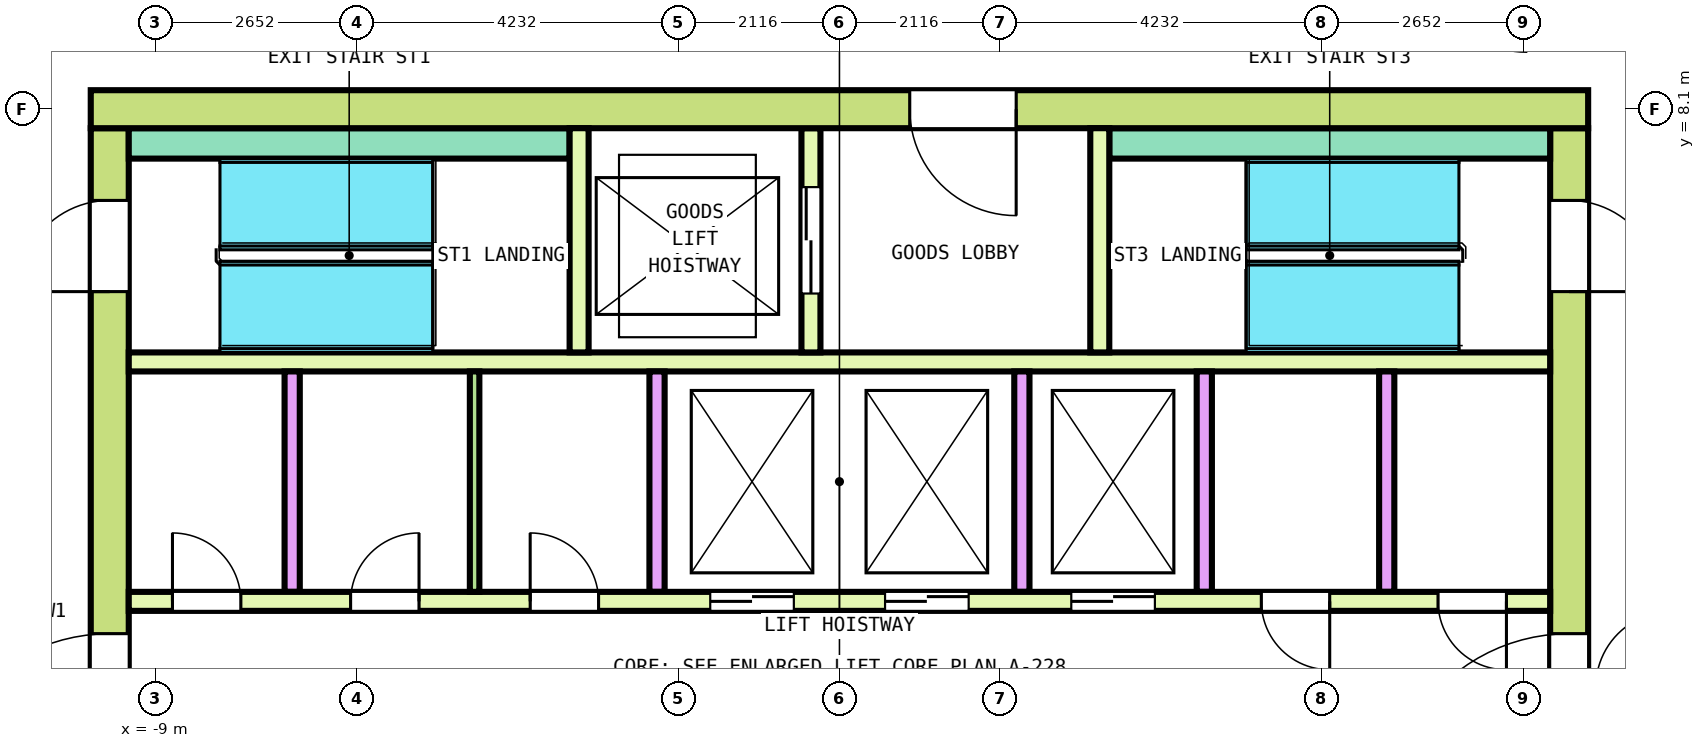
"""IFC4 building model, lengths in metres.
Left out: names, types, materials, properties, quantities, classifications, styles, units other than length and angle.
Written with IfcOpenShell. Run it as: python <this file> out.ifc"""

import sys

from ifc_helpers import new_model, si_unit, direction, frame, frame_2d, origin, place, context, subcontext, project, spatial, rectangle, extrude, element, fill, save


model = new_model("IFC4")
c1 = context("Model", 3, precision=1e-05, world=origin(), true_north=direction((0.0, 1.0)))
c2 = subcontext(c1, "Body", "Model", "MODEL_VIEW")
j1 = project(units=[si_unit("LENGTHUNIT", "METRE"), si_unit("PLANEANGLEUNIT", "RADIAN")], contexts=[c1])
p1 = place(None, origin())
s1 = spatial("IfcSite", under=j1, at=p1, CompositionType="ELEMENT")
p2 = place(p1, origin())
s2 = spatial("IfcBuilding", under=s1, at=p2, CompositionType="ELEMENT")
p3 = place(p2, frame((0.0, 0.0, 324.6)))
s3 = spatial("IfcBuildingStorey", under=s2, at=p3, CompositionType="ELEMENT", Elevation=324.6)
p4 = place(p3, frame((-9.85, 8.1, 0.0), z_axis=(0.0, 0.0, 1.0), x_axis=(1.0, 0.0, 0.0)))
e1 = element("IfcWall", 1, at=p4, inside=s3, PredefinedType="SHEAR", context=c2, shape_type="SweptSolid", body=[
    extrude(rectangle(XDim=19.7, YDim=0.5, at=frame_2d((9.85, 0.0))), origin(), (0.0, 0.0, 1.0), 3.7),
])
p5 = place(p4, frame((10.775, 0.0, 0.0)))
e2 = element("IfcOpeningElement", 2, at=p5, cuts=e1, PredefinedType="OPENING", context=c2, shape_type="SweptSolid", body=[
    extrude(rectangle(XDim=1.4, YDim=2.1, at=frame_2d((0.7, 1.05))), frame((0.0, 0.26, 0.0), z_axis=(0.0, -1.0, 0.0), x_axis=(1.0, 0.0, 0.0)), (0.0, 0.0, 1.0), 0.52),
])
p6 = place(p3, frame((-9.6, -7.85, 0.0), z_axis=(0.0, 0.0, 1.0), x_axis=(0.0, 1.0, 0.0)))
e3 = element("IfcWall", 3, at=p6, inside=s3, PredefinedType="SHEAR", context=c2, shape_type="SweptSolid", body=[
    extrude(rectangle(XDim=15.7, YDim=0.5, at=frame_2d((7.85, 0.0))), origin(), (0.0, 0.0, 1.0), 3.7),
])
p7 = place(p6, frame((6.65, 0.0, 0.0)))
e4 = element("IfcOpeningElement", 4, at=p7, cuts=e3, PredefinedType="OPENING", context=c2, shape_type="SweptSolid", body=[
    extrude(rectangle(XDim=2.4, YDim=2.1, at=frame_2d((1.2, 1.05))), frame((0.0, 0.26, 0.0), z_axis=(0.0, -1.0, 0.0), x_axis=(1.0, 0.0, 0.0)), (0.0, 0.0, 1.0), 0.52),
])
p8 = place(p6, frame((13.55, 0.0, 0.0)))
e5 = element("IfcOpeningElement", 5, at=p8, cuts=e3, PredefinedType="OPENING", context=c2, shape_type="SweptSolid", body=[
    extrude(rectangle(XDim=1.2, YDim=2.1, at=frame_2d((0.6, 1.05))), frame((0.0, 0.26, 0.0), z_axis=(0.0, -1.0, 0.0), x_axis=(1.0, 0.0, 0.0)), (0.0, 0.0, 1.0), 0.52),
])
p9 = place(p6, frame((0.95, 0.0, 0.0)))
e6 = element("IfcOpeningElement", 6, at=p9, cuts=e3, PredefinedType="OPENING", context=c2, shape_type="SweptSolid", body=[
    extrude(rectangle(XDim=1.2, YDim=2.1, at=frame_2d((0.6, 1.05))), frame((0.0, 0.26, 0.0), z_axis=(0.0, -1.0, 0.0), x_axis=(1.0, 0.0, 0.0)), (0.0, 0.0, 1.0), 0.52),
])
p10 = place(p3, frame((9.6, -7.85, 0.0), z_axis=(0.0, 0.0, 1.0), x_axis=(0.0, 1.0, 0.0)))
e7 = element("IfcWall", 7, at=p10, inside=s3, PredefinedType="SHEAR", context=c2, shape_type="SweptSolid", body=[
    extrude(rectangle(XDim=15.7, YDim=0.5, at=frame_2d((7.85, 0.0))), origin(), (0.0, 0.0, 1.0), 3.7),
])
p11 = place(p10, frame((6.65, 0.0, 0.0)))
e8 = element("IfcOpeningElement", 8, at=p11, cuts=e7, PredefinedType="OPENING", context=c2, shape_type="SweptSolid", body=[
    extrude(rectangle(XDim=2.4, YDim=2.1, at=frame_2d((1.2, 1.05))), frame((0.0, 0.26, 0.0), z_axis=(0.0, -1.0, 0.0), x_axis=(1.0, 0.0, 0.0)), (0.0, 0.0, 1.0), 0.52),
])
p12 = place(p10, frame((13.55, 0.0, 0.0)))
e9 = element("IfcOpeningElement", 9, at=p12, cuts=e7, PredefinedType="OPENING", context=c2, shape_type="SweptSolid", body=[
    extrude(rectangle(XDim=1.2, YDim=2.1, at=frame_2d((0.6, 1.05))), frame((0.0, 0.26, 0.0), z_axis=(0.0, -1.0, 0.0), x_axis=(1.0, 0.0, 0.0)), (0.0, 0.0, 1.0), 0.52),
])
p13 = place(p10, frame((1.05, 0.0, 0.0)))
e10 = element("IfcOpeningElement", 10, at=p13, cuts=e7, PredefinedType="OPENING", context=c2, shape_type="SweptSolid", body=[
    extrude(rectangle(XDim=1.0, YDim=2.1, at=frame_2d((0.5, 1.05))), frame((0.0, 0.26, 0.0), z_axis=(0.0, -1.0, 0.0), x_axis=(1.0, 0.0, 0.0)), (0.0, 0.0, 1.0), 0.52),
])
p14 = place(p3, frame((-9.35, 1.625, 0.0), z_axis=(0.0, 0.0, 1.0), x_axis=(1.0, 0.0, 0.0)))
e11 = element("IfcWall", 11, at=p14, inside=s3, PredefinedType="SOLIDWALL", context=c2, shape_type="SweptSolid", body=[
    extrude(rectangle(XDim=18.7, YDim=0.25, at=frame_2d((9.35, 0.0))), origin(), (0.0, 0.0, 1.0), 3.7),
])
p15 = place(p14, frame((7.65, 0.0, 0.0)))
e12 = element("IfcOpeningElement", 12, at=p15, cuts=e11, PredefinedType="OPENING", context=c2, shape_type="SweptSolid", body=[
    extrude(rectangle(XDim=1.1, YDim=2.1, at=frame_2d((0.55, 1.05))), frame((0.0, 0.135, 0.0), z_axis=(0.0, -1.0, 0.0), x_axis=(1.0, 0.0, 0.0)), (0.0, 0.0, 1.0), 0.27),
])
p16 = place(p14, frame((9.95, 0.0, 0.0)))
e13 = element("IfcOpeningElement", 13, at=p16, cuts=e11, PredefinedType="OPENING", context=c2, shape_type="SweptSolid", body=[
    extrude(rectangle(XDim=1.1, YDim=2.1, at=frame_2d((0.55, 1.05))), frame((0.0, 0.135, 0.0), z_axis=(0.0, -1.0, 0.0), x_axis=(1.0, 0.0, 0.0)), (0.0, 0.0, 1.0), 0.27),
])
p17 = place(p14, frame((12.4, 0.0, 0.0)))
e14 = element("IfcOpeningElement", 14, at=p17, cuts=e11, PredefinedType="OPENING", context=c2, shape_type="SweptSolid", body=[
    extrude(rectangle(XDim=1.1, YDim=2.1, at=frame_2d((0.55, 1.05))), frame((0.0, 0.135, 0.0), z_axis=(0.0, -1.0, 0.0), x_axis=(1.0, 0.0, 0.0)), (0.0, 0.0, 1.0), 0.27),
])
p18 = place(p14, frame((0.575, 0.0, 0.0)))
e15 = element("IfcOpeningElement", 15, at=p18, cuts=e11, PredefinedType="OPENING", context=c2, shape_type="SweptSolid", body=[
    extrude(rectangle(XDim=0.9, YDim=2.1, at=frame_2d((0.45, 1.05))), frame((0.0, 0.135, 0.0), z_axis=(0.0, -1.0, 0.0), x_axis=(1.0, 0.0, 0.0)), (0.0, 0.0, 1.0), 0.27),
])
p19 = place(p14, frame((2.919, 0.0, 0.0)))
e16 = element("IfcOpeningElement", 16, at=p19, cuts=e11, PredefinedType="OPENING", context=c2, shape_type="SweptSolid", body=[
    extrude(rectangle(XDim=0.9, YDim=2.1, at=frame_2d((0.45, 1.05))), frame((0.0, 0.135, 0.0), z_axis=(0.0, -1.0, 0.0), x_axis=(1.0, 0.0, 0.0)), (0.0, 0.0, 1.0), 0.27),
])
p20 = place(p14, frame((5.281, 0.0, 0.0)))
e17 = element("IfcOpeningElement", 17, at=p20, cuts=e11, PredefinedType="OPENING", context=c2, shape_type="SweptSolid", body=[
    extrude(rectangle(XDim=0.9, YDim=2.1, at=frame_2d((0.45, 1.05))), frame((0.0, 0.135, 0.0), z_axis=(0.0, -1.0, 0.0), x_axis=(1.0, 0.0, 0.0)), (0.0, 0.0, 1.0), 0.27),
])
p21 = place(p14, frame((14.9, 0.0, 0.0)))
e18 = element("IfcOpeningElement", 18, at=p21, cuts=e11, PredefinedType="OPENING", context=c2, shape_type="SweptSolid", body=[
    extrude(rectangle(XDim=0.9, YDim=2.1, at=frame_2d((0.45, 1.05))), frame((0.0, 0.135, 0.0), z_axis=(0.0, -1.0, 0.0), x_axis=(1.0, 0.0, 0.0)), (0.0, 0.0, 1.0), 0.27),
])
p22 = place(p14, frame((17.225, 0.0, 0.0)))
e19 = element("IfcOpeningElement", 19, at=p22, cuts=e11, PredefinedType="OPENING", context=c2, shape_type="SweptSolid", body=[
    extrude(rectangle(XDim=0.9, YDim=2.1, at=frame_2d((0.45, 1.05))), frame((0.0, 0.135, 0.0), z_axis=(0.0, -1.0, 0.0), x_axis=(1.0, 0.0, 0.0)), (0.0, 0.0, 1.0), 0.27),
])
p23 = place(p3, frame((-9.35, 4.775, 0.0), z_axis=(0.0, 0.0, 1.0), x_axis=(1.0, 0.0, 0.0)))
e20 = element("IfcWall", 20, at=p23, inside=s3, PredefinedType="SOLIDWALL", context=c2, shape_type="SweptSolid", body=[
    extrude(rectangle(XDim=18.7, YDim=0.25, at=frame_2d((9.35, 0.0))), origin(), (0.0, 0.0, 1.0), 3.7),
])
for number, where, z_axis, x_axis in (
    (21, (-7.2, 1.75, 0.0), (0.0, 0.0, 1.0), (0.0, 1.0, 0.0)),
    (22, (-2.4, 1.75, 0.0), (0.0, 0.0, 1.0), (0.0, 1.0, 0.0)),
    (23, (2.4, 1.75, 0.0), (0.0, 0.0, 1.0), (0.0, 1.0, 0.0)),
    (24, (4.8, 1.75, 0.0), (0.0, 0.0, 1.0), (0.0, 1.0, 0.0)),
    (25, (7.2, 1.75, 0.0), (0.0, 0.0, 1.0), (0.0, 1.0, 0.0)),
):
    element("IfcWall", number, at=place(p3, frame(where, z_axis=z_axis, x_axis=x_axis)), inside=s3, PredefinedType="SOLIDWALL", context=c2, shape_type="SweptSolid", body=[
        extrude(rectangle(XDim=2.9, YDim=0.2, at=frame_2d((1.45, 0.0))), origin(), (0.0, 0.0, 1.0), 3.7),
    ])
for number, where, z_axis, x_axis in (
    (26, (-9.35, 7.65, 0.0), (0.0, 0.0, 1.0), (1.0, 0.0, 0.0)),
    (27, (3.55, 7.65, 0.0), (0.0, 0.0, 1.0), (1.0, 0.0, 0.0)),
):
    element("IfcWall", number, at=place(p3, frame(where, z_axis=z_axis, x_axis=x_axis)), inside=s3, PredefinedType="SOLIDWALL", context=c2, shape_type="SweptSolid", body=[
        extrude(rectangle(XDim=5.8, YDim=0.4, at=frame_2d((2.9, 0.0))), origin(), (0.0, 0.0, 1.0), 3.7),
    ])
p24 = place(p3, frame((-3.425, 4.9, 0.0), z_axis=(0.0, 0.0, 1.0), x_axis=(0.0, 1.0, 0.0)))
e28 = element("IfcWall", 28, at=p24, inside=s3, PredefinedType="SOLIDWALL", context=c2, shape_type="SweptSolid", body=[
    extrude(rectangle(XDim=2.95, YDim=0.25, at=frame_2d((1.475, 0.0))), origin(), (0.0, 0.0, 1.0), 3.7),
])
p25 = place(p3, frame((-0.375, 4.9, 0.0), z_axis=(0.0, 0.0, 1.0), x_axis=(0.0, 1.0, 0.0)))
e29 = element("IfcWall", 29, at=p25, inside=s3, PredefinedType="SOLIDWALL", context=c2, shape_type="SweptSolid", body=[
    extrude(rectangle(XDim=2.95, YDim=0.25, at=frame_2d((1.475, 0.0))), origin(), (0.0, 0.0, 1.0), 3.7),
])
p26 = place(p25, frame((0.775, 0.0, 0.0)))
e30 = element("IfcOpeningElement", 30, at=p26, cuts=e29, PredefinedType="OPENING", context=c2, shape_type="SweptSolid", body=[
    extrude(rectangle(XDim=1.4, YDim=2.1, at=frame_2d((0.7, 1.05))), frame((0.0, 0.135, 0.0), z_axis=(0.0, -1.0, 0.0), x_axis=(1.0, 0.0, 0.0)), (0.0, 0.0, 1.0), 0.27),
])
p27 = place(p3, frame((3.425, 4.9, 0.0), z_axis=(0.0, 0.0, 1.0), x_axis=(0.0, 1.0, 0.0)))
e31 = element("IfcWall", 31, at=p27, inside=s3, PredefinedType="SOLIDWALL", context=c2, shape_type="SweptSolid", body=[
    extrude(rectangle(XDim=2.95, YDim=0.25, at=frame_2d((1.475, 0.0))), origin(), (0.0, 0.0, 1.0), 3.7),
])
p28 = place(p3, frame((-4.8, 1.75, 0.0), z_axis=(0.0, 0.0, 1.0), x_axis=(0.0, 1.0, 0.0)))
e32 = element("IfcWall", 32, at=p28, inside=s3, PredefinedType="PARTITIONING", context=c2, shape_type="SweptSolid", body=[
    extrude(rectangle(XDim=2.9, YDim=0.125, at=frame_2d((1.45, 0.0))), origin(), (0.0, 0.0, 1.0), 3.7),
])
p29 = place(p15, origin())
e33 = element("IfcDoor", 33, at=p29, inside=s3, OperationType="DOUBLE_DOOR_SLIDING", PredefinedType="DOOR", context=c2, shape_type="SweptSolid", body=[
    extrude(rectangle(XDim=1.1, YDim=2.1, at=frame_2d((0.55, 1.05))), frame((0.0, 0.075, 0.0), z_axis=(0.0, -1.0, 0.0), x_axis=(1.0, 0.0, 0.0)), (0.0, 0.0, 1.0), 0.15),
])
fill(e12, e33)
p30 = place(p16, origin())
e34 = element("IfcDoor", 34, at=p30, inside=s3, OperationType="DOUBLE_DOOR_SLIDING", PredefinedType="DOOR", context=c2, shape_type="SweptSolid", body=[
    extrude(rectangle(XDim=1.1, YDim=2.1, at=frame_2d((0.55, 1.05))), frame((0.0, 0.075, 0.0), z_axis=(0.0, -1.0, 0.0), x_axis=(1.0, 0.0, 0.0)), (0.0, 0.0, 1.0), 0.15),
])
fill(e13, e34)
p31 = place(p17, origin())
e35 = element("IfcDoor", 35, at=p31, inside=s3, OperationType="DOUBLE_DOOR_SLIDING", PredefinedType="DOOR", context=c2, shape_type="SweptSolid", body=[
    extrude(rectangle(XDim=1.1, YDim=2.1, at=frame_2d((0.55, 1.05))), frame((0.0, 0.075, 0.0), z_axis=(0.0, -1.0, 0.0), x_axis=(1.0, 0.0, 0.0)), (0.0, 0.0, 1.0), 0.15),
])
fill(e14, e35)
p32 = place(p26, origin())
e36 = element("IfcDoor", 36, at=p32, inside=s3, OperationType="DOUBLE_DOOR_SLIDING", PredefinedType="DOOR", context=c2, shape_type="SweptSolid", body=[
    extrude(rectangle(XDim=1.4, YDim=2.1, at=frame_2d((0.7, 1.05))), frame((0.0, 0.075, 0.0), z_axis=(0.0, -1.0, 0.0), x_axis=(1.0, 0.0, 0.0)), (0.0, 0.0, 1.0), 0.15),
])
fill(e30, e36)
p33 = place(p7, origin())
e37 = element("IfcDoor", 37, at=p33, inside=s3, OperationType="DOUBLE_DOOR_SINGLE_SWING", PredefinedType="DOOR", context=c2, shape_type="SweptSolid", body=[
    extrude(rectangle(XDim=2.4, YDim=2.1, at=frame_2d((1.2, 1.05))), frame((0.0, 0.2, 0.0), z_axis=(0.0, -1.0, 0.0), x_axis=(1.0, 0.0, 0.0)), (0.0, 0.0, 1.0), 0.4),
])
fill(e4, e37)
p34 = place(p11, origin())
e38 = element("IfcDoor", 38, at=p34, inside=s3, OperationType="DOUBLE_DOOR_SINGLE_SWING", PredefinedType="DOOR", context=c2, shape_type="SweptSolid", body=[
    extrude(rectangle(XDim=2.4, YDim=2.1, at=frame_2d((1.2, 1.05))), frame((0.0, 0.2, 0.0), z_axis=(0.0, -1.0, 0.0), x_axis=(1.0, 0.0, 0.0)), (0.0, 0.0, 1.0), 0.4),
])
fill(e8, e38)
p35 = place(p8, origin())
e39 = element("IfcDoor", 39, at=p35, inside=s3, OperationType="SINGLE_SWING_RIGHT", PredefinedType="DOOR", context=c2, shape_type="SweptSolid", body=[
    extrude(rectangle(XDim=1.2, YDim=2.1, at=frame_2d((0.6, 1.05))), frame((0.0, 0.2, 0.0), z_axis=(0.0, -1.0, 0.0), x_axis=(1.0, 0.0, 0.0)), (0.0, 0.0, 1.0), 0.4),
])
fill(e5, e39)
p36 = place(p12, origin())
e40 = element("IfcDoor", 40, at=p36, inside=s3, OperationType="SINGLE_SWING_RIGHT", PredefinedType="DOOR", context=c2, shape_type="SweptSolid", body=[
    extrude(rectangle(XDim=1.2, YDim=2.1, at=frame_2d((0.6, 1.05))), frame((0.0, 0.2, 0.0), z_axis=(0.0, -1.0, 0.0), x_axis=(1.0, 0.0, 0.0)), (0.0, 0.0, 1.0), 0.4),
])
fill(e9, e40)
p37 = place(p5, origin())
e41 = element("IfcDoor", 41, at=p37, inside=s3, OperationType="DOUBLE_DOOR_SINGLE_SWING", PredefinedType="DOOR", context=c2, shape_type="SweptSolid", body=[
    extrude(rectangle(XDim=1.4, YDim=2.1, at=frame_2d((0.7, 1.05))), frame((0.0, 0.2, 0.0), z_axis=(0.0, -1.0, 0.0), x_axis=(1.0, 0.0, 0.0)), (0.0, 0.0, 1.0), 0.4),
])
fill(e2, e41)
p38 = place(p18, origin())
e42 = element("IfcDoor", 42, at=p38, inside=s3, OperationType="SINGLE_SWING_RIGHT", PredefinedType="DOOR", context=c2, shape_type="SweptSolid", body=[
    extrude(rectangle(XDim=0.9, YDim=2.1, at=frame_2d((0.45, 1.05))), frame((0.0, 0.075, 0.0), z_axis=(0.0, -1.0, 0.0), x_axis=(1.0, 0.0, 0.0)), (0.0, 0.0, 1.0), 0.15),
])
fill(e15, e42)
p39 = place(p19, origin())
e43 = element("IfcDoor", 43, at=p39, inside=s3, OperationType="SINGLE_SWING_LEFT", PredefinedType="DOOR", context=c2, shape_type="SweptSolid", body=[
    extrude(rectangle(XDim=0.9, YDim=2.1, at=frame_2d((0.45, 1.05))), frame((0.0, 0.075, 0.0), z_axis=(0.0, -1.0, 0.0), x_axis=(1.0, 0.0, 0.0)), (0.0, 0.0, 1.0), 0.15),
])
fill(e16, e43)
p40 = place(p20, origin())
e44 = element("IfcDoor", 44, at=p40, inside=s3, OperationType="SINGLE_SWING_RIGHT", PredefinedType="DOOR", context=c2, shape_type="SweptSolid", body=[
    extrude(rectangle(XDim=0.9, YDim=2.1, at=frame_2d((0.45, 1.05))), frame((0.0, 0.075, 0.0), z_axis=(0.0, -1.0, 0.0), x_axis=(1.0, 0.0, 0.0)), (0.0, 0.0, 1.0), 0.15),
])
fill(e17, e44)
p41 = place(p21, origin())
e45 = element("IfcDoor", 45, at=p41, inside=s3, OperationType="SINGLE_SWING_LEFT", PredefinedType="DOOR", context=c2, shape_type="SweptSolid", body=[
    extrude(rectangle(XDim=0.9, YDim=2.1, at=frame_2d((0.45, 1.05))), frame((0.0, 0.075, 0.0), z_axis=(0.0, -1.0, 0.0), x_axis=(1.0, 0.0, 0.0)), (0.0, 0.0, 1.0), 0.15),
])
fill(e18, e45)
p42 = place(p22, origin())
e46 = element("IfcDoor", 46, at=p42, inside=s3, OperationType="SINGLE_SWING_RIGHT", PredefinedType="DOOR", context=c2, shape_type="SweptSolid", body=[
    extrude(rectangle(XDim=0.9, YDim=2.1, at=frame_2d((0.45, 1.05))), frame((0.0, 0.075, 0.0), z_axis=(0.0, -1.0, 0.0), x_axis=(1.0, 0.0, 0.0)), (0.0, 0.0, 1.0), 0.15),
])
fill(e19, e46)
save(model, sys.argv[1])
